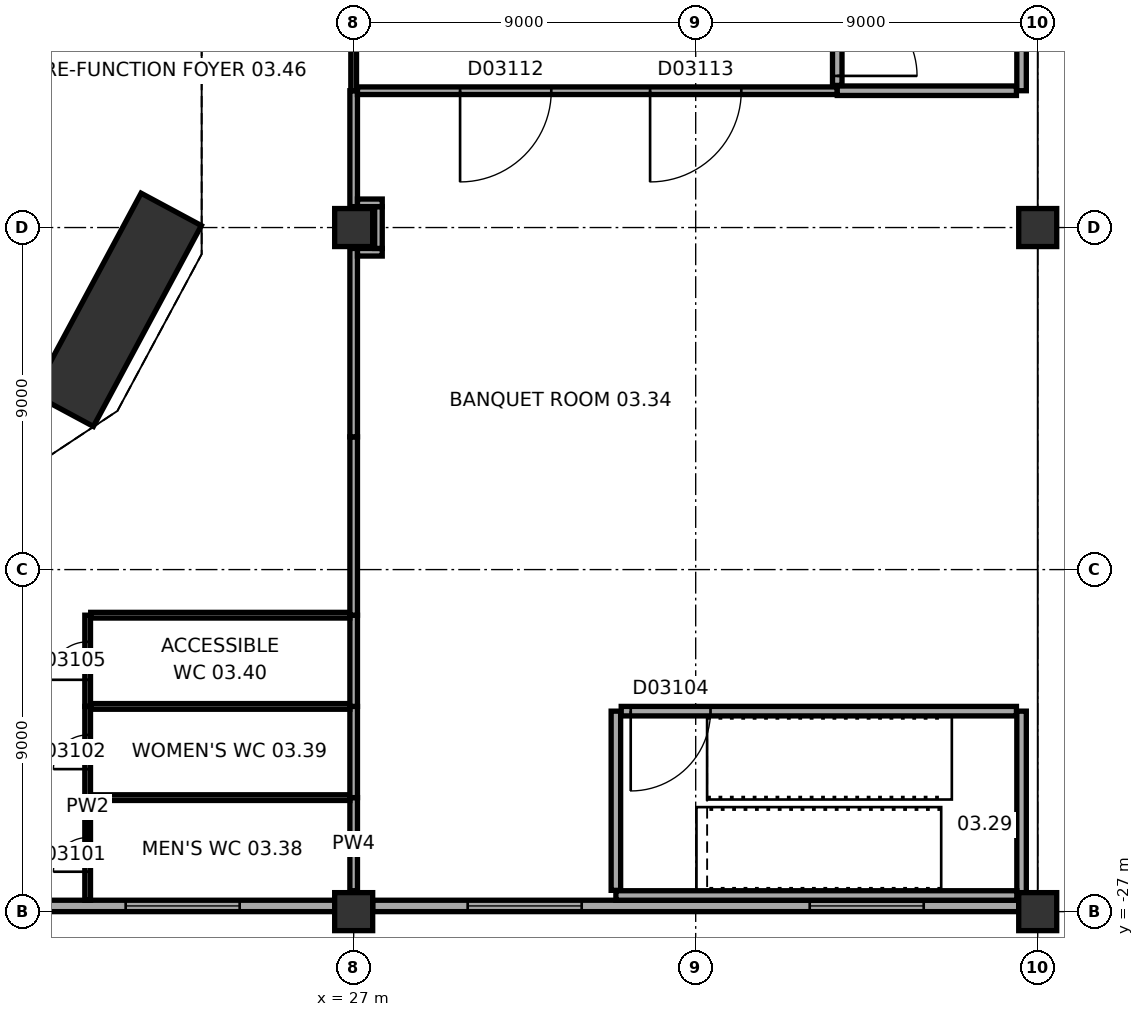
"""IFC4 building model, lengths in metres.
Left out: names, types, materials, properties, quantities, classifications, styles, units other than length and angle.
Written with IfcOpenShell. Run it as: python <this file> out.ifc"""

import sys

from ifc_helpers import new_model, si_unit, direction, frame, frame_2d, origin, origin_2d, place, context, subcontext, project, spatial, rectangle, extrude, element, fill, save


model = new_model("IFC4")
c1 = context("Model", 3, precision=1e-05, world=origin(), true_north=direction((0.0, 1.0)))
c2 = subcontext(c1, "Body", "Model", "MODEL_VIEW")
j1 = project(units=[si_unit("LENGTHUNIT", "METRE"), si_unit("PLANEANGLEUNIT", "RADIAN")], contexts=[c1])
p1 = place(None, origin())
s1 = spatial("IfcSite", under=j1, at=p1, CompositionType="ELEMENT")
p2 = place(p1, origin())
s2 = spatial("IfcBuilding", under=s1, at=p2, CompositionType="ELEMENT")
p3 = place(p2, frame((0.0, 0.0, 21.0)))
s3 = spatial("IfcBuildingStorey", under=s2, at=p3, CompositionType="ELEMENT", Elevation=21.0)
p4 = place(p3, frame((20.779, -11.165, 0.0), z_axis=(0.0, 0.0, 1.0), x_axis=(0.473322742071, 0.880889086003, 0.0)))
e1 = element("IfcColumn", 1, at=p4, inside=s3, PredefinedType="COLUMN", context=c2, shape_type="SweptSolid", body=[
    extrude(rectangle(XDim=6.0, YDim=1.8, at=origin_2d()), origin(), (0.0, 0.0, 1.0), 8.0),
])
for number, where, z_axis, x_axis in (
    (2, (27.0, -27.0, 0.0), (0.0, 0.0, 1.0), (1.0, 0.0, 0.0)),
    (3, (27.0, -9.0, 0.0), (0.0, 0.0, 1.0), (1.0, 0.0, 0.0)),
    (4, (45.0, -27.0, 0.0), (0.0, 0.0, 1.0), (1.0, 0.0, 0.0)),
    (5, (45.0, -9.0, 0.0), (0.0, 0.0, 1.0), (1.0, 0.0, 0.0)),
):
    element("IfcColumn", number, at=place(p3, frame(where, z_axis=z_axis, x_axis=x_axis)), inside=s3, PredefinedType="COLUMN", context=c2, shape_type="SweptSolid", body=[
        extrude(rectangle(XDim=1.0, YDim=1.0, at=origin_2d()), origin(), (0.0, 0.0, 1.0), 8.0),
    ])
p5 = place(p3, frame((9.5, -26.85, 0.0), z_axis=(0.0, 0.0, 1.0), x_axis=(1.0, 0.0, 0.0)))
e6 = element("IfcWall", 6, at=p5, inside=s3, PredefinedType="STANDARD", context=c2, shape_type="SweptSolid", body=[
    extrude(rectangle(XDim=17.0, YDim=0.3, at=frame_2d((8.5, 0.0))), origin(), (0.0, 0.0, 1.0), 6.5),
])
p6 = place(p5, frame((2.5, 0.0, 1.0)))
e7 = element("IfcOpeningElement", 7, at=p6, cuts=e6, PredefinedType="OPENING", context=c2, shape_type="SweptSolid", body=[
    extrude(rectangle(XDim=3.0, YDim=4.0, at=frame_2d((1.5, 2.0))), frame((0.0, 0.16, 0.0), z_axis=(0.0, -1.0, 0.0), x_axis=(1.0, 0.0, 0.0)), (0.0, 0.0, 1.0), 0.32),
])
p7 = place(p5, frame((11.5, 0.0, 1.0)))
e8 = element("IfcOpeningElement", 8, at=p7, cuts=e6, PredefinedType="OPENING", context=c2, shape_type="SweptSolid", body=[
    extrude(rectangle(XDim=3.0, YDim=4.0, at=frame_2d((1.5, 2.0))), frame((0.0, 0.16, 0.0), z_axis=(0.0, -1.0, 0.0), x_axis=(1.0, 0.0, 0.0)), (0.0, 0.0, 1.0), 0.32),
])
p8 = place(p3, frame((27.5, -26.85, 0.0), z_axis=(0.0, 0.0, 1.0), x_axis=(1.0, 0.0, 0.0)))
e9 = element("IfcWall", 9, at=p8, inside=s3, PredefinedType="STANDARD", context=c2, shape_type="SweptSolid", body=[
    extrude(rectangle(XDim=17.0, YDim=0.3, at=frame_2d((8.5, 0.0))), origin(), (0.0, 0.0, 1.0), 6.5),
])
p9 = place(p8, frame((2.5, 0.0, 1.0)))
e10 = element("IfcOpeningElement", 10, at=p9, cuts=e9, PredefinedType="OPENING", context=c2, shape_type="SweptSolid", body=[
    extrude(rectangle(XDim=3.0, YDim=4.0, at=frame_2d((1.5, 2.0))), frame((0.0, 0.16, 0.0), z_axis=(0.0, -1.0, 0.0), x_axis=(1.0, 0.0, 0.0)), (0.0, 0.0, 1.0), 0.32),
])
p10 = place(p8, frame((11.5, 0.0, 1.0)))
e11 = element("IfcOpeningElement", 11, at=p10, cuts=e9, PredefinedType="OPENING", context=c2, shape_type="SweptSolid", body=[
    extrude(rectangle(XDim=3.0, YDim=4.0, at=frame_2d((1.5, 2.0))), frame((0.0, 0.16, 0.0), z_axis=(0.0, -1.0, 0.0), x_axis=(1.0, 0.0, 0.0)), (0.0, 0.0, 1.0), 0.32),
])
p11 = place(p3, frame((20.0, -26.7, 0.0), z_axis=(0.0, 0.0, 1.0), x_axis=(0.0, 1.0, 0.0)))
e12 = element("IfcWall", 12, at=p11, inside=s3, PredefinedType="PARTITIONING", context=c2, shape_type="SweptSolid", body=[
    extrude(rectangle(XDim=2.7, YDim=0.15, at=frame_2d((1.35, 0.0))), origin(), (0.0, 0.0, 1.0), 7.7),
])
p12 = place(p11, frame((0.75, 0.0, 0.0)))
e13 = element("IfcOpeningElement", 13, at=p12, cuts=e12, PredefinedType="OPENING", context=c2, shape_type="SweptSolid", body=[
    extrude(rectangle(XDim=0.9, YDim=2.1, at=frame_2d((0.45, 1.05))), frame((0.0, 0.085, 0.0), z_axis=(0.0, -1.0, 0.0), x_axis=(1.0, 0.0, 0.0)), (0.0, 0.0, 1.0), 0.17),
])
p13 = place(p3, frame((27.0, -26.45, 0.0), z_axis=(0.0, 0.0, 1.0), x_axis=(0.0, 1.0, 0.0)))
e14 = element("IfcWall", 14, at=p13, inside=s3, PredefinedType="PARTITIONING", context=c2, shape_type="SweptSolid", body=[
    extrude(rectangle(XDim=2.45, YDim=0.2, at=frame_2d((1.225, 0.0))), origin(), (0.0, 0.0, 1.0), 6.5),
])
p14 = place(p3, frame((33.9, -26.44, 0.0), z_axis=(0.0, 0.0, 1.0), x_axis=(0.0, 1.0, 0.0)))
e15 = element("IfcWall", 15, at=p14, inside=s3, PredefinedType="SOLIDWALL", context=c2, shape_type="SweptSolid", body=[
    extrude(rectangle(XDim=4.715, YDim=0.25, at=frame_2d((2.357, 0.0))), origin(), (0.0, 0.0, 1.0), 7.7),
])
p15 = place(p3, frame((20.0, -24.0, 0.0), z_axis=(0.0, 0.0, 1.0), x_axis=(0.0, 1.0, 0.0)))
e16 = element("IfcWall", 16, at=p15, inside=s3, PredefinedType="PARTITIONING", context=c2, shape_type="SweptSolid", body=[
    extrude(rectangle(XDim=2.4, YDim=0.15, at=frame_2d((1.2, 0.0))), origin(), (0.0, 0.0, 1.0), 7.7),
])
p16 = place(p15, frame((0.75, 0.0, 0.0)))
e17 = element("IfcOpeningElement", 17, at=p16, cuts=e16, PredefinedType="OPENING", context=c2, shape_type="SweptSolid", body=[
    extrude(rectangle(XDim=0.9, YDim=2.1, at=frame_2d((0.45, 1.05))), frame((0.0, 0.085, 0.0), z_axis=(0.0, -1.0, 0.0), x_axis=(1.0, 0.0, 0.0)), (0.0, 0.0, 1.0), 0.17),
])
p17 = place(p3, frame((20.08, -24.0, 0.0), z_axis=(0.0, 0.0, 1.0), x_axis=(1.0, 0.0, 0.0)))
e18 = element("IfcWall", 18, at=p17, inside=s3, PredefinedType="PARTITIONING", context=c2, shape_type="SweptSolid", body=[
    extrude(rectangle(XDim=6.82, YDim=0.15, at=frame_2d((3.41, 0.0))), origin(), (0.0, 0.0, 1.0), 7.7),
])
p18 = place(p3, frame((27.0, -24.0, 0.0), z_axis=(0.0, 0.0, 1.0), x_axis=(0.0, 1.0, 0.0)))
e19 = element("IfcWall", 19, at=p18, inside=s3, PredefinedType="PARTITIONING", context=c2, shape_type="SweptSolid", body=[
    extrude(rectangle(XDim=2.4, YDim=0.2, at=frame_2d((1.2, 0.0))), origin(), (0.0, 0.0, 1.0), 6.5),
])
p19 = place(p3, frame((34.04, -21.725, 0.0), z_axis=(0.0, 0.0, 1.0), x_axis=(1.0, 0.0, 0.0)))
e20 = element("IfcWall", 20, at=p19, inside=s3, PredefinedType="SOLIDWALL", context=c2, shape_type="SweptSolid", body=[
    extrude(rectangle(XDim=10.4, YDim=0.25, at=frame_2d((5.2, 0.0))), origin(), (0.0, 0.0, 1.0), 7.7),
])
p20 = place(p19, frame((0.25, 0.0, 0.0)))
e21 = element("IfcOpeningElement", 21, at=p20, cuts=e20, PredefinedType="OPENING", context=c2, shape_type="SweptSolid", body=[
    extrude(rectangle(XDim=2.1, YDim=2.4, at=frame_2d((1.05, 1.2))), frame((0.0, 0.135, 0.0), z_axis=(0.0, -1.0, 0.0), x_axis=(1.0, 0.0, 0.0)), (0.0, 0.0, 1.0), 0.27),
])
p21 = place(p3, frame((20.0, -21.6, 0.0), z_axis=(0.0, 0.0, 1.0), x_axis=(0.0, 1.0, 0.0)))
e22 = element("IfcWall", 22, at=p21, inside=s3, PredefinedType="PARTITIONING", context=c2, shape_type="SweptSolid", body=[
    extrude(rectangle(XDim=2.4, YDim=0.15, at=frame_2d((1.2, 0.0))), origin(), (0.0, 0.0, 1.0), 7.7),
])
p22 = place(p21, frame((0.7, 0.0, 0.0)))
e23 = element("IfcOpeningElement", 23, at=p22, cuts=e22, PredefinedType="OPENING", context=c2, shape_type="SweptSolid", body=[
    extrude(rectangle(XDim=1.0, YDim=2.1, at=frame_2d((0.5, 1.05))), frame((0.0, 0.085, 0.0), z_axis=(0.0, -1.0, 0.0), x_axis=(1.0, 0.0, 0.0)), (0.0, 0.0, 1.0), 0.17),
])
p23 = place(p3, frame((20.08, -21.6, 0.0), z_axis=(0.0, 0.0, 1.0), x_axis=(1.0, 0.0, 0.0)))
e24 = element("IfcWall", 24, at=p23, inside=s3, PredefinedType="PARTITIONING", context=c2, shape_type="SweptSolid", body=[
    extrude(rectangle(XDim=6.82, YDim=0.15, at=frame_2d((3.41, 0.0))), origin(), (0.0, 0.0, 1.0), 7.7),
])
p24 = place(p3, frame((27.0, -21.6, 0.0), z_axis=(0.0, 0.0, 1.0), x_axis=(0.0, 1.0, 0.0)))
e25 = element("IfcWall", 25, at=p24, inside=s3, PredefinedType="PARTITIONING", context=c2, shape_type="SweptSolid", body=[
    extrude(rectangle(XDim=2.4, YDim=0.2, at=frame_2d((1.2, 0.0))), origin(), (0.0, 0.0, 1.0), 6.5),
])
p25 = place(p3, frame((20.08, -19.2, 0.0), z_axis=(0.0, 0.0, 1.0), x_axis=(1.0, 0.0, 0.0)))
e26 = element("IfcWall", 26, at=p25, inside=s3, PredefinedType="PARTITIONING", context=c2, shape_type="SweptSolid", body=[
    extrude(rectangle(XDim=6.82, YDim=0.15, at=frame_2d((3.41, 0.0))), origin(), (0.0, 0.0, 1.0), 7.7),
])
p26 = place(p3, frame((27.0, -19.2, 0.0), z_axis=(0.0, 0.0, 1.0), x_axis=(0.0, 1.0, 0.0)))
e27 = element("IfcWall", 27, at=p26, inside=s3, PredefinedType="PARTITIONING", context=c2, shape_type="SweptSolid", body=[
    extrude(rectangle(XDim=4.692, YDim=0.2, at=frame_2d((2.346, 0.0))), origin(), (0.0, 0.0, 1.0), 6.5),
])
p27 = place(p3, frame((27.0, -14.508, 0.0), z_axis=(0.0, 0.0, 1.0), x_axis=(0.0, 1.0, 0.0)))
e28 = element("IfcWall", 28, at=p27, inside=s3, PredefinedType="PARTITIONING", context=c2, shape_type="SweptSolid", body=[
    extrude(rectangle(XDim=4.958, YDim=0.2, at=frame_2d((2.479, 0.0))), origin(), (0.0, 0.0, 1.0), 6.5),
])
p28 = place(p3, frame((27.1, -9.65, 0.0), z_axis=(0.0, 0.0, 1.0), x_axis=(1.0, 0.0, 0.0)))
e29 = element("IfcWall", 29, at=p28, inside=s3, PredefinedType="PARTITIONING", context=c2, shape_type="SweptSolid", body=[
    extrude(rectangle(XDim=0.652, YDim=0.2, at=frame_2d((0.326, 0.0))), origin(), (0.0, 0.0, 1.0), 7.7),
])
p29 = place(p3, frame((27.652, -9.55, 0.0), z_axis=(0.0, 0.0, 1.0), x_axis=(0.0, 1.0, 0.0)))
e30 = element("IfcWall", 30, at=p29, inside=s3, PredefinedType="PARTITIONING", context=c2, shape_type="SweptSolid", body=[
    extrude(rectangle(XDim=1.1, YDim=0.2, at=frame_2d((0.55, 0.0))), origin(), (0.0, 0.0, 1.0), 7.7),
])
p30 = place(p3, frame((27.0, -8.45, 0.0), z_axis=(0.0, 0.0, 1.0), x_axis=(0.0, 1.0, 0.0)))
e31 = element("IfcWall", 31, at=p30, inside=s3, PredefinedType="PARTITIONING", context=c2, shape_type="SweptSolid", body=[
    extrude(rectangle(XDim=3.05, YDim=0.2, at=frame_2d((1.525, 0.0))), origin(), (0.0, 0.0, 1.0), 6.5),
])
p31 = place(p3, frame((27.1, -8.35, 0.0), z_axis=(0.0, 0.0, 1.0), x_axis=(1.0, 0.0, 0.0)))
e32 = element("IfcWall", 32, at=p31, inside=s3, PredefinedType="PARTITIONING", context=c2, shape_type="SweptSolid", body=[
    extrude(rectangle(XDim=0.652, YDim=0.2, at=frame_2d((0.326, 0.0))), origin(), (0.0, 0.0, 1.0), 7.7),
])
p32 = place(p3, frame((27.0, -5.4, 0.0), z_axis=(0.0, 0.0, 1.0), x_axis=(0.0, 1.0, 0.0)))
e33 = element("IfcWall", 33, at=p32, inside=s3, PredefinedType="PARTITIONING", context=c2, shape_type="SweptSolid", body=[
    extrude(rectangle(XDim=6.547, YDim=0.15, at=frame_2d((3.274, 0.0))), origin(), (0.0, 0.0, 1.0), 6.5),
])
p33 = place(p32, frame((3.548, 0.0, 0.0)))
e34 = element("IfcOpeningElement", 34, at=p33, cuts=e33, PredefinedType="OPENING", context=c2, shape_type="SweptSolid", body=[
    extrude(rectangle(XDim=2.4, YDim=2.4, at=frame_2d((1.2, 1.2))), frame((0.0, 0.085, 0.0), z_axis=(0.0, -1.0, 0.0), x_axis=(1.0, 0.0, 0.0)), (0.0, 0.0, 1.0), 0.17),
])
p34 = place(p3, frame((27.1, -5.4, 0.0), z_axis=(0.0, 0.0, 1.0), x_axis=(1.0, 0.0, 0.0)))
e35 = element("IfcWall", 35, at=p34, inside=s3, PredefinedType="PARTITIONING", context=c2, shape_type="SweptSolid", body=[
    extrude(rectangle(XDim=12.625, YDim=0.2, at=frame_2d((6.312, 0.0))), origin(), (0.0, 0.0, 1.0), 7.7),
])
p35 = place(p34, frame((2.7, 0.0, 0.0)))
e36 = element("IfcOpeningElement", 36, at=p35, cuts=e35, PredefinedType="OPENING", context=c2, shape_type="SweptSolid", body=[
    extrude(rectangle(XDim=2.4, YDim=2.4, at=frame_2d((1.2, 1.2))), frame((0.0, 0.11, 0.0), z_axis=(0.0, -1.0, 0.0), x_axis=(1.0, 0.0, 0.0)), (0.0, 0.0, 1.0), 0.22),
])
p36 = place(p34, frame((7.7, 0.0, 0.0)))
e37 = element("IfcOpeningElement", 37, at=p36, cuts=e35, PredefinedType="OPENING", context=c2, shape_type="SweptSolid", body=[
    extrude(rectangle(XDim=2.4, YDim=2.4, at=frame_2d((1.2, 1.2))), frame((0.0, 0.11, 0.0), z_axis=(0.0, -1.0, 0.0), x_axis=(1.0, 0.0, 0.0)), (0.0, 0.0, 1.0), 0.22),
])
p37 = place(p3, frame((44.44, -5.4, 0.0), z_axis=(0.0, 0.0, 1.0), x_axis=(-1.0, 0.0, 0.0)))
e38 = element("IfcWall", 38, at=p37, inside=s3, PredefinedType="SOLIDWALL", context=c2, shape_type="SweptSolid", body=[
    extrude(rectangle(XDim=4.715, YDim=0.25, at=frame_2d((2.357, 0.0))), origin(), (0.0, 0.0, 1.0), 7.7),
])
p38 = place(p3, frame((39.725, -5.26, 0.0), z_axis=(0.0, 0.0, 1.0), x_axis=(0.0, 1.0, 0.0)))
e39 = element("IfcWall", 39, at=p38, inside=s3, PredefinedType="SOLIDWALL", context=c2, shape_type="SweptSolid", body=[
    extrude(rectangle(XDim=10.52, YDim=0.25, at=frame_2d((5.26, 0.0))), origin(), (0.0, 0.0, 1.0), 7.7),
])
p39 = place(p38, frame((0.25, 0.0, 0.0)))
e40 = element("IfcOpeningElement", 40, at=p39, cuts=e39, PredefinedType="OPENING", context=c2, shape_type="SweptSolid", body=[
    extrude(rectangle(XDim=2.1, YDim=2.4, at=frame_2d((1.05, 1.2))), frame((0.0, 0.135, 0.0), z_axis=(0.0, -1.0, 0.0), x_axis=(1.0, 0.0, 0.0)), (0.0, 0.0, 1.0), 0.27),
])
p40 = place(p3, frame((44.575, -21.725, 0.0), z_axis=(0.0, 0.0, 1.0), x_axis=(0.0, -1.0, 0.0)))
e41 = element("IfcWall", 41, at=p40, inside=s3, PredefinedType="SOLIDWALL", context=c2, shape_type="SweptSolid", body=[
    extrude(rectangle(XDim=4.975, YDim=0.25, at=frame_2d((2.487, 0.0))), origin(), (0.0, 0.0, 1.0), 7.7),
])
p41 = place(p3, frame((44.45, -26.575, 0.0), z_axis=(0.0, 0.0, 1.0), x_axis=(-1.0, 0.0, 0.0)))
e42 = element("IfcWall", 42, at=p41, inside=s3, PredefinedType="SOLIDWALL", context=c2, shape_type="SweptSolid", body=[
    extrude(rectangle(XDim=10.55, YDim=0.25, at=frame_2d((5.275, 0.0))), origin(), (0.0, 0.0, 1.0), 7.7),
])
p42 = place(p3, frame((44.575, 5.4, 0.0), z_axis=(0.0, 0.0, 1.0), x_axis=(0.0, -1.0, 0.0)))
e43 = element("IfcWall", 43, at=p42, inside=s3, PredefinedType="SOLIDWALL", context=c2, shape_type="SweptSolid", body=[
    extrude(rectangle(XDim=10.8, YDim=0.25, at=frame_2d((5.4, 0.0))), origin(), (0.0, 0.0, 1.0), 7.7),
])
p43 = place(p7, origin())
e44 = element("IfcWindow", 44, at=p43, inside=s3, PartitioningType="SINGLE_PANEL", PredefinedType="WINDOW", context=c2, shape_type="SweptSolid", body=[
    extrude(rectangle(XDim=3.0, YDim=4.0, at=frame_2d((1.5, 2.0))), frame((0.0, 0.03, 0.0), z_axis=(0.0, -1.0, 0.0), x_axis=(1.0, 0.0, 0.0)), (0.0, 0.0, 1.0), 0.06),
])
fill(e8, e44)
p44 = place(p9, origin())
e45 = element("IfcWindow", 45, at=p44, inside=s3, PartitioningType="SINGLE_PANEL", PredefinedType="WINDOW", context=c2, shape_type="SweptSolid", body=[
    extrude(rectangle(XDim=3.0, YDim=4.0, at=frame_2d((1.5, 2.0))), frame((0.0, 0.03, 0.0), z_axis=(0.0, -1.0, 0.0), x_axis=(1.0, 0.0, 0.0)), (0.0, 0.0, 1.0), 0.06),
])
fill(e10, e45)
p45 = place(p10, origin())
e46 = element("IfcWindow", 46, at=p45, inside=s3, PartitioningType="SINGLE_PANEL", PredefinedType="WINDOW", context=c2, shape_type="SweptSolid", body=[
    extrude(rectangle(XDim=3.0, YDim=4.0, at=frame_2d((1.5, 2.0))), frame((0.0, 0.03, 0.0), z_axis=(0.0, -1.0, 0.0), x_axis=(1.0, 0.0, 0.0)), (0.0, 0.0, 1.0), 0.06),
])
fill(e11, e46)
p46 = place(p12, origin())
e47 = element("IfcDoor", 47, at=p46, inside=s3, OperationType="SINGLE_SWING_LEFT", PredefinedType="DOOR", context=c2, shape_type="SweptSolid", body=[
    extrude(rectangle(XDim=0.9, YDim=2.1, at=frame_2d((0.45, 1.05))), frame((0.0, 0.025, 0.0), z_axis=(0.0, -1.0, 0.0), x_axis=(1.0, 0.0, 0.0)), (0.0, 0.0, 1.0), 0.05),
])
fill(e13, e47)
p47 = place(p16, origin())
e48 = element("IfcDoor", 48, at=p47, inside=s3, OperationType="SINGLE_SWING_LEFT", PredefinedType="DOOR", context=c2, shape_type="SweptSolid", body=[
    extrude(rectangle(XDim=0.9, YDim=2.1, at=frame_2d((0.45, 1.05))), frame((0.0, 0.025, 0.0), z_axis=(0.0, -1.0, 0.0), x_axis=(1.0, 0.0, 0.0)), (0.0, 0.0, 1.0), 0.05),
])
fill(e17, e48)
p48 = place(p20, frame((2.1, 0.0, 0.0), z_axis=(0.0, 0.0, 1.0), x_axis=(-1.0, 0.0, 0.0)))
e49 = element("IfcDoor", 49, at=p48, inside=s3, OperationType="DOUBLE_DOOR_SINGLE_SWING", PredefinedType="DOOR", context=c2, shape_type="SweptSolid", body=[
    extrude(rectangle(XDim=2.1, YDim=2.4, at=frame_2d((1.05, 1.2))), frame((0.0, 0.025, 0.0), z_axis=(0.0, -1.0, 0.0), x_axis=(1.0, 0.0, 0.0)), (0.0, 0.0, 1.0), 0.05),
])
fill(e21, e49)
p49 = place(p22, origin())
e50 = element("IfcDoor", 50, at=p49, inside=s3, OperationType="SINGLE_SWING_LEFT", PredefinedType="DOOR", context=c2, shape_type="SweptSolid", body=[
    extrude(rectangle(XDim=1.0, YDim=2.1, at=frame_2d((0.5, 1.05))), frame((0.0, 0.025, 0.0), z_axis=(0.0, -1.0, 0.0), x_axis=(1.0, 0.0, 0.0)), (0.0, 0.0, 1.0), 0.05),
])
fill(e23, e50)
p50 = place(p35, origin())
e51 = element("IfcDoor", 51, at=p50, inside=s3, OperationType="DOUBLE_DOOR_SINGLE_SWING", PredefinedType="DOOR", context=c2, shape_type="SweptSolid", body=[
    extrude(rectangle(XDim=2.4, YDim=2.4, at=frame_2d((1.2, 1.2))), frame((0.0, 0.025, 0.0), z_axis=(0.0, -1.0, 0.0), x_axis=(1.0, 0.0, 0.0)), (0.0, 0.0, 1.0), 0.05),
])
fill(e36, e51)
p51 = place(p36, origin())
e52 = element("IfcDoor", 52, at=p51, inside=s3, OperationType="DOUBLE_DOOR_SINGLE_SWING", PredefinedType="DOOR", context=c2, shape_type="SweptSolid", body=[
    extrude(rectangle(XDim=2.4, YDim=2.4, at=frame_2d((1.2, 1.2))), frame((0.0, 0.025, 0.0), z_axis=(0.0, -1.0, 0.0), x_axis=(1.0, 0.0, 0.0)), (0.0, 0.0, 1.0), 0.05),
])
fill(e37, e52)
p52 = place(p39, frame((2.1, 0.0, 0.0), z_axis=(0.0, 0.0, 1.0), x_axis=(-1.0, 0.0, 0.0)))
e53 = element("IfcDoor", 53, at=p52, inside=s3, OperationType="DOUBLE_DOOR_SINGLE_SWING", PredefinedType="DOOR", context=c2, shape_type="SweptSolid", body=[
    extrude(rectangle(XDim=2.1, YDim=2.4, at=frame_2d((1.05, 1.2))), frame((0.0, 0.025, 0.0), z_axis=(0.0, -1.0, 0.0), x_axis=(1.0, 0.0, 0.0)), (0.0, 0.0, 1.0), 0.05),
])
fill(e40, e53)
save(model, sys.argv[1])
